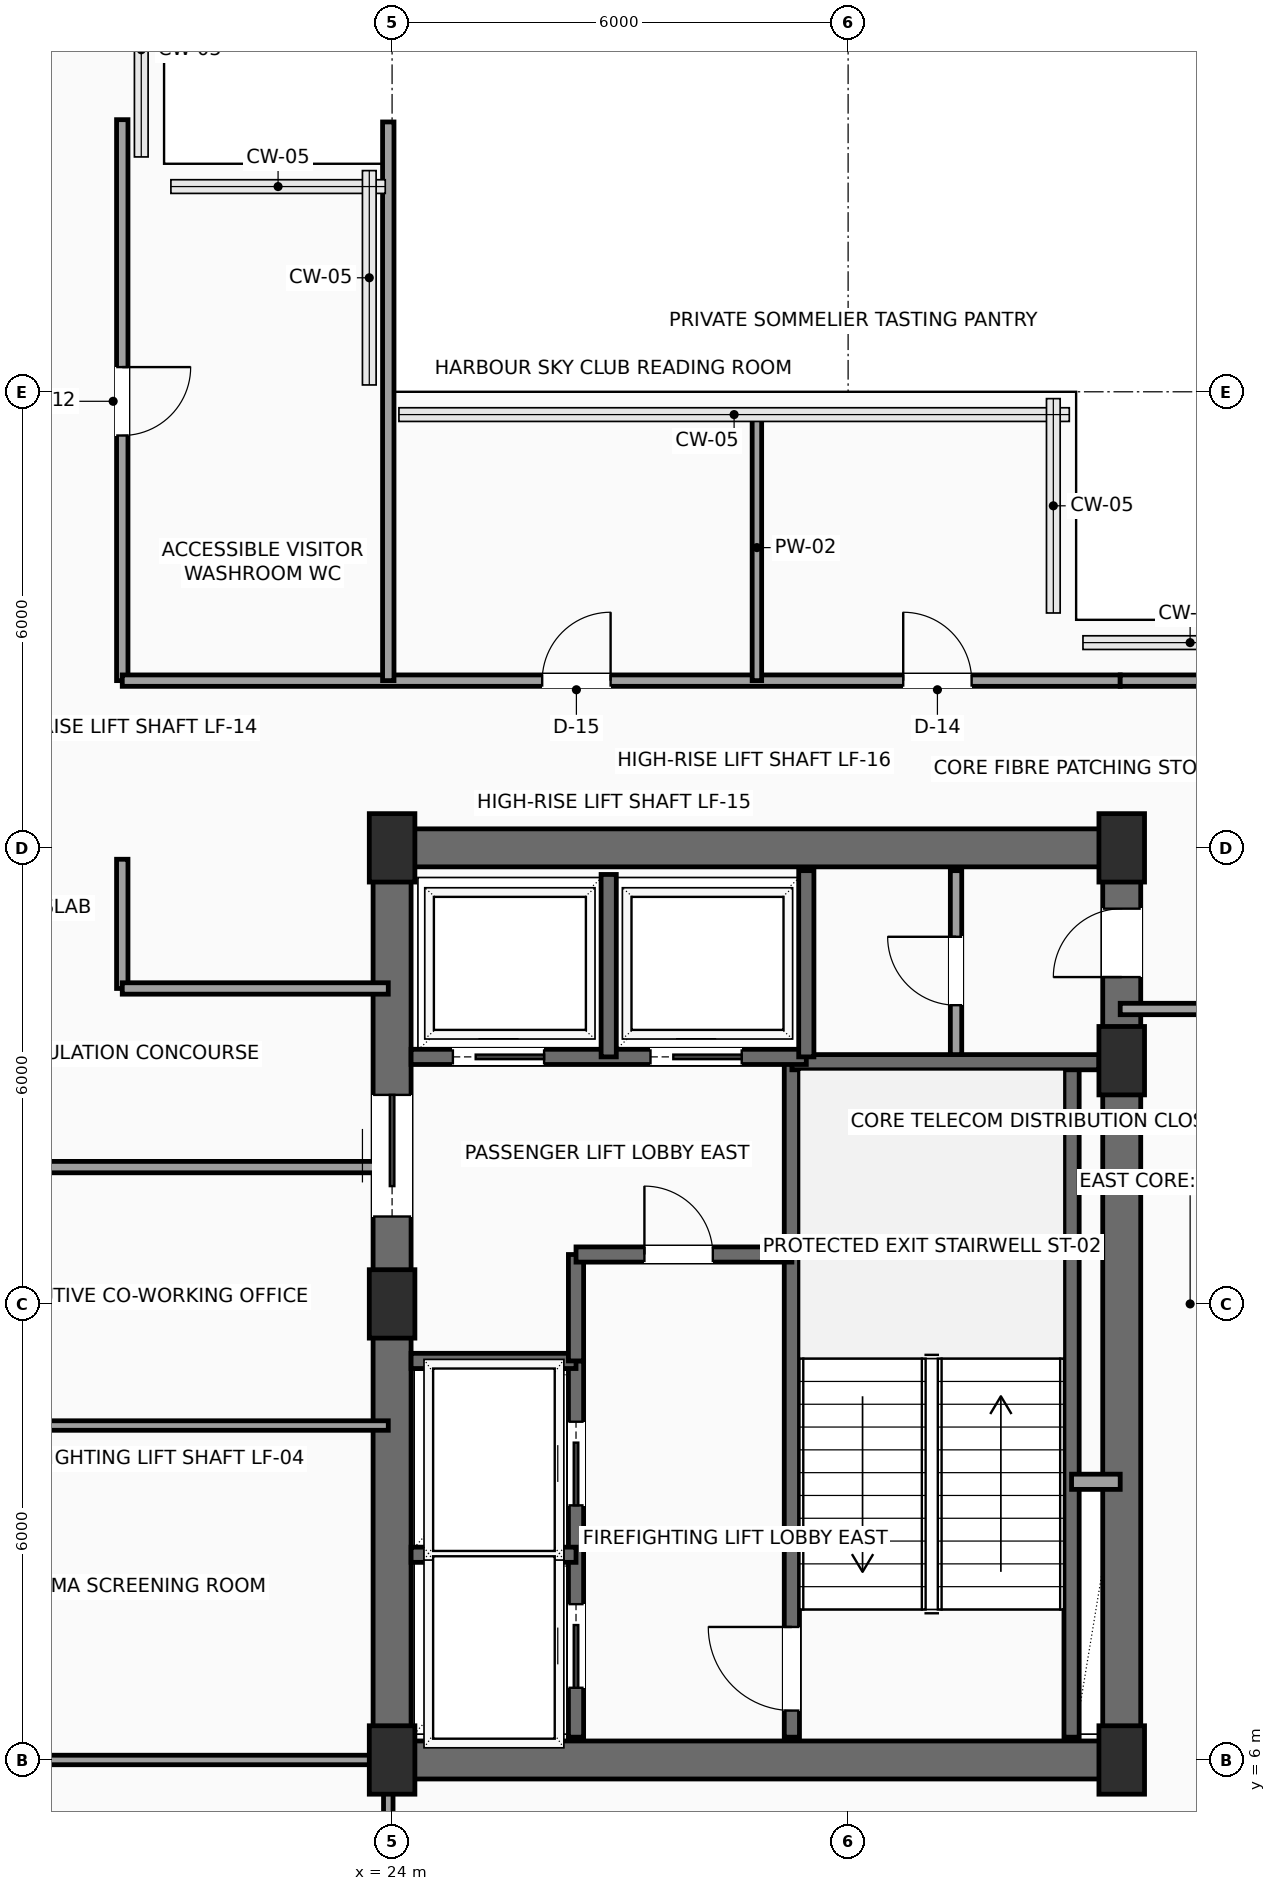
"""IFC4 building model, lengths in metres.
Left out: names, types, materials, properties, quantities, classifications, styles, units other than length and angle.
Written with IfcOpenShell. Run it as: python <this file> out.ifc"""

import sys

from ifc_helpers import new_model, si_unit, direction, frame, frame_2d, origin, origin_2d, place, context, subcontext, project, spatial, rectangle, extrude, element, fill, save


model = new_model("IFC4")
c1 = context("Model", 3, precision=1e-05, world=origin(), true_north=direction((0.0, 1.0)))
c2 = subcontext(c1, "Body", "Model", "MODEL_VIEW")
j1 = project(units=[si_unit("LENGTHUNIT", "METRE"), si_unit("PLANEANGLEUNIT", "RADIAN")], contexts=[c1])
p1 = place(None, origin())
s1 = spatial("IfcSite", under=j1, at=p1, CompositionType="ELEMENT")
p2 = place(p1, origin())
s2 = spatial("IfcBuilding", under=s1, at=p2, CompositionType="ELEMENT")
p3 = place(p2, frame((0.0, 0.0, 260.7)))
s3 = spatial("IfcBuildingStorey", under=s2, at=p3, CompositionType="ELEMENT", Elevation=260.7)
for number, where, z_axis, x_axis in (
    (1, (24.0, 6.0, 0.0), (0.0, 0.0, 1.0), (1.0, 0.0, 0.0)),
    (2, (24.0, 12.0, 0.0), (0.0, 0.0, 1.0), (1.0, 0.0, 0.0)),
    (3, (24.0, 18.0, 0.0), (0.0, 0.0, 1.0), (1.0, 0.0, 0.0)),
    (4, (33.6, 6.0, 0.0), (0.0, 0.0, 1.0), (1.0, 0.0, 0.0)),
    (5, (33.6, 15.2, 0.0), (0.0, 0.0, 1.0), (1.0, 0.0, 0.0)),
    (6, (33.6, 18.0, 0.0), (0.0, 0.0, 1.0), (1.0, 0.0, 0.0)),
):
    element("IfcColumn", number, at=place(p3, frame(where, z_axis=z_axis, x_axis=x_axis)), inside=s3, PredefinedType="COLUMN", context=c2, shape_type="SweptSolid", body=[
        extrude(rectangle(XDim=0.6, YDim=0.9, at=origin_2d()), origin(), (0.0, 0.0, 1.0), 3.5),
    ])
for number, where, z_axis, x_axis in (
    (7, (24.0, 6.0, 0.0), (0.0, 0.0, 1.0), (1.0, 0.0, 0.0)),
    (8, (24.0, 18.0, 0.0), (0.0, 0.0, 1.0), (1.0, 0.0, 0.0)),
):
    element("IfcWall", number, at=place(p3, frame(where, z_axis=z_axis, x_axis=x_axis)), inside=s3, PredefinedType="SHEAR", context=c2, shape_type="SweptSolid", body=[
        extrude(rectangle(XDim=9.6, YDim=0.5, at=frame_2d((4.8, 0.0))), origin(), (0.0, 0.0, 1.0), 3.3),
    ])
p4 = place(p3, frame((24.0, 6.0, 0.0), z_axis=(0.0, 0.0, 1.0), x_axis=(0.0, 1.0, 0.0)))
e9 = element("IfcWall", 9, at=p4, inside=s3, PredefinedType="SHEAR", context=c2, shape_type="SweptSolid", body=[
    extrude(rectangle(XDim=12.0, YDim=0.5, at=frame_2d((6.0, 0.0))), origin(), (0.0, 0.0, 1.0), 3.3),
])
p5 = place(p4, frame((7.15, 0.0, 0.0)))
e10 = element("IfcOpeningElement", 10, at=p5, cuts=e9, PredefinedType="OPENING", context=c2, shape_type="SweptSolid", body=[
    extrude(rectangle(XDim=1.6, YDim=2.3, at=frame_2d((0.8, 1.15))), frame((0.0, 0.26, 0.0), z_axis=(0.0, -1.0, 0.0), x_axis=(1.0, 0.0, 0.0)), (0.0, 0.0, 1.0), 0.52),
])
p6 = place(p3, frame((33.6, 6.0, 0.0), z_axis=(0.0, 0.0, 1.0), x_axis=(0.0, 1.0, 0.0)))
e11 = element("IfcWall", 11, at=p6, inside=s3, PredefinedType="SHEAR", context=c2, shape_type="SweptSolid", body=[
    extrude(rectangle(XDim=12.0, YDim=0.5, at=frame_2d((6.0, 0.0))), origin(), (0.0, 0.0, 1.0), 3.3),
])
p7 = place(p6, frame((10.3, 0.0, 0.0)))
e12 = element("IfcOpeningElement", 12, at=p7, cuts=e11, PredefinedType="OPENING", context=c2, shape_type="SweptSolid", body=[
    extrude(rectangle(XDim=0.9, YDim=2.15, at=frame_2d((0.45, 1.075))), frame((0.0, 0.26, 0.0), z_axis=(0.0, -1.0, 0.0), x_axis=(1.0, 0.0, 0.0)), (0.0, 0.0, 1.0), 0.52),
])
p8 = place(p3, frame((29.26, 6.3, 0.0), z_axis=(0.0, 0.0, 1.0), x_axis=(0.0, 1.0, 0.0)))
e13 = element("IfcWall", 13, at=p8, inside=s3, PredefinedType="SHEAR", context=c2, shape_type="SweptSolid", body=[
    extrude(rectangle(XDim=8.88, YDim=0.2, at=frame_2d((4.44, 0.0))), origin(), (0.0, 0.0, 1.0), 3.3),
])
p9 = place(p8, frame((0.35, 0.0, 0.0)))
e14 = element("IfcOpeningElement", 14, at=p9, cuts=e13, PredefinedType="OPENING", context=c2, shape_type="SweptSolid", body=[
    extrude(rectangle(XDim=1.1, YDim=2.2, at=frame_2d((0.55, 1.1))), frame((0.0, 0.11, 0.0), z_axis=(0.0, -1.0, 0.0), x_axis=(1.0, 0.0, 0.0)), (0.0, 0.0, 1.0), 0.22),
])
p10 = place(p3, frame((32.94, 6.3, 0.0), z_axis=(0.0, 0.0, 1.0), x_axis=(0.0, 1.0, 0.0)))
e15 = element("IfcWall", 15, at=p10, inside=s3, PredefinedType="SHEAR", context=c2, shape_type="SweptSolid", body=[
    extrude(rectangle(XDim=8.88, YDim=0.2, at=frame_2d((4.44, 0.0))), origin(), (0.0, 0.0, 1.0), 3.3),
])
p11 = place(p3, frame((29.26, 15.18, 0.0), z_axis=(0.0, 0.0, 1.0), x_axis=(1.0, 0.0, 0.0)))
e16 = element("IfcWall", 16, at=p11, inside=s3, PredefinedType="SHEAR", context=c2, shape_type="SweptSolid", body=[
    extrude(rectangle(XDim=4.04, YDim=0.2, at=frame_2d((2.02, 0.0))), origin(), (0.0, 0.0, 1.0), 3.3),
])
p12 = place(p3, frame((26.42, 6.3, 0.0), z_axis=(0.0, 0.0, 1.0), x_axis=(0.0, 1.0, 0.0)))
e17 = element("IfcWall", 17, at=p12, inside=s3, PredefinedType="SHEAR", context=c2, shape_type="SweptSolid", body=[
    extrude(rectangle(XDim=4.95, YDim=0.2, at=frame_2d((2.475, 0.0))), origin(), (0.0, 0.0, 1.0), 3.3),
])
p13 = place(p12, frame((0.65, 0.0, 0.0)))
e18 = element("IfcOpeningElement", 18, at=p13, cuts=e17, PredefinedType="OPENING", context=c2, shape_type="SweptSolid", body=[
    extrude(rectangle(XDim=1.1, YDim=2.2, at=frame_2d((0.55, 1.1))), frame((0.0, 0.11, 0.0), z_axis=(0.0, -1.0, 0.0), x_axis=(1.0, 0.0, 0.0)), (0.0, 0.0, 1.0), 0.22),
])
p14 = place(p12, frame((3.05, 0.0, 0.0)))
e19 = element("IfcOpeningElement", 19, at=p14, cuts=e17, PredefinedType="OPENING", context=c2, shape_type="SweptSolid", body=[
    extrude(rectangle(XDim=1.1, YDim=2.2, at=frame_2d((0.55, 1.1))), frame((0.0, 0.11, 0.0), z_axis=(0.0, -1.0, 0.0), x_axis=(1.0, 0.0, 0.0)), (0.0, 0.0, 1.0), 0.22),
])
for number, where, z_axis, x_axis in (
    (20, (24.25, 8.7, 0.0), (0.0, 0.0, 1.0), (1.0, 0.0, 0.0)),
    (21, (24.25, 11.25, 0.0), (0.0, 0.0, 1.0), (1.0, 0.0, 0.0)),
):
    element("IfcWall", number, at=place(p3, frame(where, z_axis=z_axis, x_axis=x_axis)), inside=s3, PredefinedType="SHEAR", context=c2, shape_type="SweptSolid", body=[
        extrude(rectangle(XDim=2.17, YDim=0.2, at=frame_2d((1.085, 0.0))), origin(), (0.0, 0.0, 1.0), 3.3),
    ])
p15 = place(p3, frame((26.42, 11.25, 0.0), z_axis=(0.0, 0.0, 1.0), x_axis=(0.0, 1.0, 0.0)))
e22 = element("IfcWall", 22, at=p15, inside=s3, PredefinedType="SHEAR", context=c2, shape_type="SweptSolid", body=[
    extrude(rectangle(XDim=1.4, YDim=0.2, at=frame_2d((0.7, 0.0))), origin(), (0.0, 0.0, 1.0), 3.3),
])
p16 = place(p3, frame((26.42, 12.65, 0.0), z_axis=(0.0, 0.0, 1.0), x_axis=(1.0, 0.0, 0.0)))
e23 = element("IfcWall", 23, at=p16, inside=s3, PredefinedType="SHEAR", context=c2, shape_type="SweptSolid", body=[
    extrude(rectangle(XDim=2.84, YDim=0.2, at=frame_2d((1.42, 0.0))), origin(), (0.0, 0.0, 1.0), 3.3),
])
p17 = place(p16, frame((0.9, 0.0, 0.0)))
e24 = element("IfcOpeningElement", 24, at=p17, cuts=e23, PredefinedType="OPENING", context=c2, shape_type="SweptSolid", body=[
    extrude(rectangle(XDim=0.9, YDim=2.15, at=frame_2d((0.45, 1.075))), frame((0.0, 0.11, 0.0), z_axis=(0.0, -1.0, 0.0), x_axis=(1.0, 0.0, 0.0)), (0.0, 0.0, 1.0), 0.22),
])
p18 = place(p3, frame((32.94, 9.66, 0.0), z_axis=(0.0, 0.0, 1.0), x_axis=(1.0, 0.0, 0.0)))
e25 = element("IfcWall", 25, at=p18, inside=s3, PredefinedType="SOLIDWALL", context=c2, shape_type="SweptSolid", body=[
    extrude(rectangle(XDim=0.64, YDim=0.2, at=frame_2d((0.32, 0.0))), origin(), (0.0, 0.0, 1.0), 3.3),
])
p19 = place(p3, frame((24.25, 15.25, 0.0), z_axis=(0.0, 0.0, 1.0), x_axis=(1.0, 0.0, 0.0)))
e26 = element("IfcWall", 26, at=p19, inside=s3, PredefinedType="SHEAR", context=c2, shape_type="SweptSolid", body=[
    extrude(rectangle(XDim=5.2, YDim=0.2, at=frame_2d((2.6, 0.0))), origin(), (0.0, 0.0, 1.0), 3.3),
])
p20 = place(p19, frame((0.55, 0.0, 0.0)))
e27 = element("IfcOpeningElement", 27, at=p20, cuts=e26, PredefinedType="OPENING", context=c2, shape_type="SweptSolid", body=[
    extrude(rectangle(XDim=1.2, YDim=2.2, at=frame_2d((0.6, 1.1))), frame((0.0, 0.11, 0.0), z_axis=(0.0, -1.0, 0.0), x_axis=(1.0, 0.0, 0.0)), (0.0, 0.0, 1.0), 0.22),
])
p21 = place(p19, frame((3.15, 0.0, 0.0)))
e28 = element("IfcOpeningElement", 28, at=p21, cuts=e26, PredefinedType="OPENING", context=c2, shape_type="SweptSolid", body=[
    extrude(rectangle(XDim=1.2, YDim=2.2, at=frame_2d((0.6, 1.1))), frame((0.0, 0.11, 0.0), z_axis=(0.0, -1.0, 0.0), x_axis=(1.0, 0.0, 0.0)), (0.0, 0.0, 1.0), 0.22),
])
p22 = place(p3, frame((26.85, 15.25, 0.0), z_axis=(0.0, 0.0, 1.0), x_axis=(0.0, 1.0, 0.0)))
e29 = element("IfcWall", 29, at=p22, inside=s3, PredefinedType="SHEAR", context=c2, shape_type="SweptSolid", body=[
    extrude(rectangle(XDim=2.4, YDim=0.2, at=frame_2d((1.2, 0.0))), origin(), (0.0, 0.0, 1.0), 3.3),
])
p23 = place(p3, frame((29.45, 15.25, 0.0), z_axis=(0.0, 0.0, 1.0), x_axis=(0.0, 1.0, 0.0)))
e30 = element("IfcWall", 30, at=p23, inside=s3, PredefinedType="SHEAR", context=c2, shape_type="SweptSolid", body=[
    extrude(rectangle(XDim=2.45, YDim=0.2, at=frame_2d((1.225, 0.0))), origin(), (0.0, 0.0, 1.0), 3.3),
])
p24 = place(p3, frame((31.42, 15.28, 0.0), z_axis=(0.0, 0.0, 1.0), x_axis=(0.0, 1.0, 0.0)))
e31 = element("IfcWall", 31, at=p24, inside=s3, PredefinedType="PARTITIONING", context=c2, shape_type="SweptSolid", body=[
    extrude(rectangle(XDim=2.42, YDim=0.15, at=frame_2d((1.21, 0.0))), origin(), (0.0, 0.0, 1.0), 3.3),
])
p25 = place(p24, frame((0.65, 0.0, 0.0)))
e32 = element("IfcOpeningElement", 32, at=p25, cuts=e31, PredefinedType="OPENING", context=c2, shape_type="SweptSolid", body=[
    extrude(rectangle(XDim=0.9, YDim=2.15, at=frame_2d((0.45, 1.075))), frame((0.0, 0.085, 0.0), z_axis=(0.0, -1.0, 0.0), x_axis=(1.0, 0.0, 0.0)), (0.0, 0.0, 1.0), 0.17),
])
p26 = place(p3, frame((20.45, 27.58, 0.0), z_axis=(0.0, 0.0, 1.0), x_axis=(0.0, -1.0, 0.0)))
e33 = element("IfcWall", 33, at=p26, inside=s3, PredefinedType="PARTITIONING", context=c2, shape_type="SweptSolid", body=[
    extrude(rectangle(XDim=7.38, YDim=0.15, at=frame_2d((3.69, 0.0))), origin(), (0.0, 0.0, 1.0), 3.3),
])
p27 = place(p26, frame((3.255, 0.0, 0.0)))
e34 = element("IfcOpeningElement", 34, at=p27, cuts=e33, PredefinedType="OPENING", context=c2, shape_type="SweptSolid", body=[
    extrude(rectangle(XDim=0.9, YDim=2.1, at=frame_2d((0.45, 1.05))), frame((0.0, 0.085, 0.0), z_axis=(0.0, -1.0, 0.0), x_axis=(1.0, 0.0, 0.0)), (0.0, 0.0, 1.0), 0.17),
])
p28 = place(p3, frame((20.45, 20.2, 0.0), z_axis=(0.0, 0.0, 1.0), x_axis=(1.0, 0.0, 0.0)))
e35 = element("IfcWall", 35, at=p28, inside=s3, PredefinedType="PARTITIONING", context=c2, shape_type="SweptSolid", body=[
    extrude(rectangle(XDim=13.13, YDim=0.15, at=frame_2d((6.565, 0.0))), origin(), (0.0, 0.0, 1.0), 3.3),
])
p29 = place(p28, frame((5.525, 0.0, 0.0)))
e36 = element("IfcOpeningElement", 36, at=p29, cuts=e35, PredefinedType="OPENING", context=c2, shape_type="SweptSolid", body=[
    extrude(rectangle(XDim=0.9, YDim=2.1, at=frame_2d((0.45, 1.05))), frame((0.0, 0.085, 0.0), z_axis=(0.0, -1.0, 0.0), x_axis=(1.0, 0.0, 0.0)), (0.0, 0.0, 1.0), 0.17),
])
p30 = place(p28, frame((10.275, 0.0, 0.0)))
e37 = element("IfcOpeningElement", 37, at=p30, cuts=e35, PredefinedType="OPENING", context=c2, shape_type="SweptSolid", body=[
    extrude(rectangle(XDim=0.9, YDim=2.1, at=frame_2d((0.45, 1.05))), frame((0.0, 0.085, 0.0), z_axis=(0.0, -1.0, 0.0), x_axis=(1.0, 0.0, 0.0)), (0.0, 0.0, 1.0), 0.17),
])
for number, where, z_axis, x_axis in (
    (38, (33.58, 20.2, 0.0), (0.0, 0.0, 1.0), (1.0, 0.0, 0.0)),
    (39, (35.7, 15.88, 0.0), (0.0, 0.0, 1.0), (-1.0, 0.0, 0.0)),
):
    element("IfcWall", number, at=place(p3, frame(where, z_axis=z_axis, x_axis=x_axis)), inside=s3, PredefinedType="PARTITIONING", context=c2, shape_type="SweptSolid", body=[
        extrude(rectangle(XDim=2.12, YDim=0.15, at=frame_2d((1.06, 0.0))), origin(), (0.0, 0.0, 1.0), 3.3),
    ])
p31 = place(p3, frame((20.45, 17.85, 0.0), z_axis=(0.0, 0.0, 1.0), x_axis=(0.0, -1.0, 0.0)))
e40 = element("IfcWall", 40, at=p31, inside=s3, PredefinedType="PARTITIONING", context=c2, shape_type="SweptSolid", body=[
    extrude(rectangle(XDim=1.7, YDim=0.15, at=frame_2d((0.85, 0.0))), origin(), (0.0, 0.0, 1.0), 3.3),
])
p32 = place(p3, frame((20.45, 16.15, 0.0), z_axis=(0.0, 0.0, 1.0), x_axis=(1.0, 0.0, 0.0)))
e41 = element("IfcWall", 41, at=p32, inside=s3, PredefinedType="PARTITIONING", context=c2, shape_type="SweptSolid", body=[
    extrude(rectangle(XDim=3.5, YDim=0.15, at=frame_2d((1.75, 0.0))), origin(), (0.0, 0.0, 1.0), 3.3),
])
p33 = place(p3, frame((23.95, 13.8, 0.0), z_axis=(0.0, 0.0, 1.0), x_axis=(-1.0, 0.0, 0.0)))
e42 = element("IfcWall", 42, at=p33, inside=s3, PredefinedType="PARTITIONING", context=c2, shape_type="SweptSolid", body=[
    extrude(rectangle(XDim=9.0, YDim=0.15, at=frame_2d((4.5, 0.0))), origin(), (0.0, 0.0, 1.0), 3.3),
])
p34 = place(p3, frame((23.95, 20.2, 0.0), z_axis=(0.0, 0.0, 1.0), x_axis=(0.0, 1.0, 0.0)))
e43 = element("IfcWall", 43, at=p34, inside=s3, PredefinedType="PARTITIONING", context=c2, shape_type="SweptSolid", body=[
    extrude(rectangle(XDim=7.35, YDim=0.15, at=frame_2d((3.675, 0.0))), origin(), (0.0, 0.0, 1.0), 3.3),
])
p35 = place(p3, frame((28.8, 20.2, 0.0), z_axis=(0.0, 0.0, 1.0), x_axis=(0.0, 1.0, 0.0)))
e44 = element("IfcWall", 44, at=p35, inside=s3, PredefinedType="PARTITIONING", context=c2, shape_type="SweptSolid", body=[
    extrude(rectangle(XDim=3.5, YDim=0.125, at=frame_2d((1.75, 0.0))), origin(), (0.0, 0.0, 1.0), 3.3),
])
p36 = place(p3, frame((14.95, 6.0, 0.0), z_axis=(0.0, 0.0, 1.0), x_axis=(1.0, 0.0, 0.0)))
e45 = element("IfcWall", 45, at=p36, inside=s3, PredefinedType="PARTITIONING", context=c2, shape_type="SweptSolid", body=[
    extrude(rectangle(XDim=9.0, YDim=0.125, at=frame_2d((4.5, 0.0))), origin(), (0.0, 0.0, 1.0), 2.992),
])
p37 = place(p3, frame((23.95, 0.3, 0.0), z_axis=(0.0, 0.0, 1.0), x_axis=(0.0, 1.0, 0.0)))
e46 = element("IfcWall", 46, at=p37, inside=s3, PredefinedType="PARTITIONING", context=c2, shape_type="SweptSolid", body=[
    extrude(rectangle(XDim=5.7, YDim=0.125, at=frame_2d((2.85, 0.0))), origin(), (0.0, 0.0, 1.0), 2.992),
])
p38 = place(p3, frame((14.95, 10.4, 0.0), z_axis=(0.0, 0.0, 1.0), x_axis=(1.0, 0.0, 0.0)))
e47 = element("IfcWall", 47, at=p38, inside=s3, PredefinedType="PARTITIONING", context=c2, shape_type="SweptSolid", body=[
    extrude(rectangle(XDim=9.0, YDim=0.125, at=frame_2d((4.5, 0.0))), origin(), (0.0, 0.0, 1.0), 3.3),
])
p39 = place(p5, origin())
e48 = element("IfcDoor", 48, at=p39, inside=s3, OperationType="DOUBLE_DOOR_SLIDING", PredefinedType="DOOR", context=c2, shape_type="SweptSolid", body=[
    extrude(rectangle(XDim=1.6, YDim=2.3, at=frame_2d((0.8, 1.15))), frame((0.0, 0.025, 0.0), z_axis=(0.0, -1.0, 0.0), x_axis=(1.0, 0.0, 0.0)), (0.0, 0.0, 1.0), 0.05),
])
fill(e10, e48)
p40 = place(p7, origin())
e49 = element("IfcDoor", 49, at=p40, inside=s3, OperationType="SINGLE_SWING_LEFT", PredefinedType="DOOR", context=c2, shape_type="SweptSolid", body=[
    extrude(rectangle(XDim=0.9, YDim=2.15, at=frame_2d((0.45, 1.075))), frame((0.0, 0.025, 0.0), z_axis=(0.0, -1.0, 0.0), x_axis=(1.0, 0.0, 0.0)), (0.0, 0.0, 1.0), 0.05),
])
fill(e12, e49)
p41 = place(p9, origin())
e50 = element("IfcDoor", 50, at=p41, inside=s3, OperationType="SINGLE_SWING_RIGHT", PredefinedType="DOOR", context=c2, shape_type="SweptSolid", body=[
    extrude(rectangle(XDim=1.1, YDim=2.2, at=frame_2d((0.55, 1.1))), frame((0.0, 0.025, 0.0), z_axis=(0.0, -1.0, 0.0), x_axis=(1.0, 0.0, 0.0)), (0.0, 0.0, 1.0), 0.05),
])
fill(e14, e50)
p42 = place(p13, origin())
e51 = element("IfcDoor", 51, at=p42, inside=s3, OperationType="SLIDING_TO_LEFT", PredefinedType="DOOR", context=c2, shape_type="SweptSolid", body=[
    extrude(rectangle(XDim=1.1, YDim=2.2, at=frame_2d((0.55, 1.1))), frame((0.0, 0.025, 0.0), z_axis=(0.0, -1.0, 0.0), x_axis=(1.0, 0.0, 0.0)), (0.0, 0.0, 1.0), 0.05),
])
fill(e18, e51)
p43 = place(p14, origin())
e52 = element("IfcDoor", 52, at=p43, inside=s3, OperationType="SLIDING_TO_LEFT", PredefinedType="DOOR", context=c2, shape_type="SweptSolid", body=[
    extrude(rectangle(XDim=1.1, YDim=2.2, at=frame_2d((0.55, 1.1))), frame((0.0, 0.025, 0.0), z_axis=(0.0, -1.0, 0.0), x_axis=(1.0, 0.0, 0.0)), (0.0, 0.0, 1.0), 0.05),
])
fill(e19, e52)
p44 = place(p17, origin())
e53 = element("IfcDoor", 53, at=p44, inside=s3, OperationType="SINGLE_SWING_LEFT", PredefinedType="DOOR", context=c2, shape_type="SweptSolid", body=[
    extrude(rectangle(XDim=0.9, YDim=2.15, at=frame_2d((0.45, 1.075))), frame((0.0, 0.025, 0.0), z_axis=(0.0, -1.0, 0.0), x_axis=(1.0, 0.0, 0.0)), (0.0, 0.0, 1.0), 0.05),
])
fill(e24, e53)
p45 = place(p20, origin())
e54 = element("IfcDoor", 54, at=p45, inside=s3, OperationType="SLIDING_TO_RIGHT", PredefinedType="DOOR", context=c2, shape_type="SweptSolid", body=[
    extrude(rectangle(XDim=1.2, YDim=2.2, at=frame_2d((0.6, 1.1))), frame((0.0, 0.025, 0.0), z_axis=(0.0, -1.0, 0.0), x_axis=(1.0, 0.0, 0.0)), (0.0, 0.0, 1.0), 0.05),
])
fill(e27, e54)
p46 = place(p21, origin())
e55 = element("IfcDoor", 55, at=p46, inside=s3, OperationType="SLIDING_TO_RIGHT", PredefinedType="DOOR", context=c2, shape_type="SweptSolid", body=[
    extrude(rectangle(XDim=1.2, YDim=2.2, at=frame_2d((0.6, 1.1))), frame((0.0, 0.025, 0.0), z_axis=(0.0, -1.0, 0.0), x_axis=(1.0, 0.0, 0.0)), (0.0, 0.0, 1.0), 0.05),
])
fill(e28, e55)
p47 = place(p25, origin())
e56 = element("IfcDoor", 56, at=p47, inside=s3, OperationType="SINGLE_SWING_RIGHT", PredefinedType="DOOR", context=c2, shape_type="SweptSolid", body=[
    extrude(rectangle(XDim=0.9, YDim=2.15, at=frame_2d((0.45, 1.075))), frame((0.0, 0.025, 0.0), z_axis=(0.0, -1.0, 0.0), x_axis=(1.0, 0.0, 0.0)), (0.0, 0.0, 1.0), 0.05),
])
fill(e32, e56)
p48 = place(p27, origin())
e57 = element("IfcDoor", 57, at=p48, inside=s3, OperationType="SINGLE_SWING_LEFT", PredefinedType="DOOR", context=c2, shape_type="SweptSolid", body=[
    extrude(rectangle(XDim=0.9, YDim=2.1, at=frame_2d((0.45, 1.05))), frame((0.0, 0.025, 0.0), z_axis=(0.0, -1.0, 0.0), x_axis=(1.0, 0.0, 0.0)), (0.0, 0.0, 1.0), 0.05),
])
fill(e34, e57)
p49 = place(p29, origin())
e58 = element("IfcDoor", 58, at=p49, inside=s3, OperationType="SINGLE_SWING_RIGHT", PredefinedType="DOOR", context=c2, shape_type="SweptSolid", body=[
    extrude(rectangle(XDim=0.9, YDim=2.1, at=frame_2d((0.45, 1.05))), frame((0.0, 0.025, 0.0), z_axis=(0.0, -1.0, 0.0), x_axis=(1.0, 0.0, 0.0)), (0.0, 0.0, 1.0), 0.05),
])
fill(e36, e58)
p50 = place(p30, origin())
e59 = element("IfcDoor", 59, at=p50, inside=s3, OperationType="SINGLE_SWING_LEFT", PredefinedType="DOOR", context=c2, shape_type="SweptSolid", body=[
    extrude(rectangle(XDim=0.9, YDim=2.1, at=frame_2d((0.45, 1.05))), frame((0.0, 0.025, 0.0), z_axis=(0.0, -1.0, 0.0), x_axis=(1.0, 0.0, 0.0)), (0.0, 0.0, 1.0), 0.05),
])
fill(e37, e59)
save(model, sys.argv[1])
